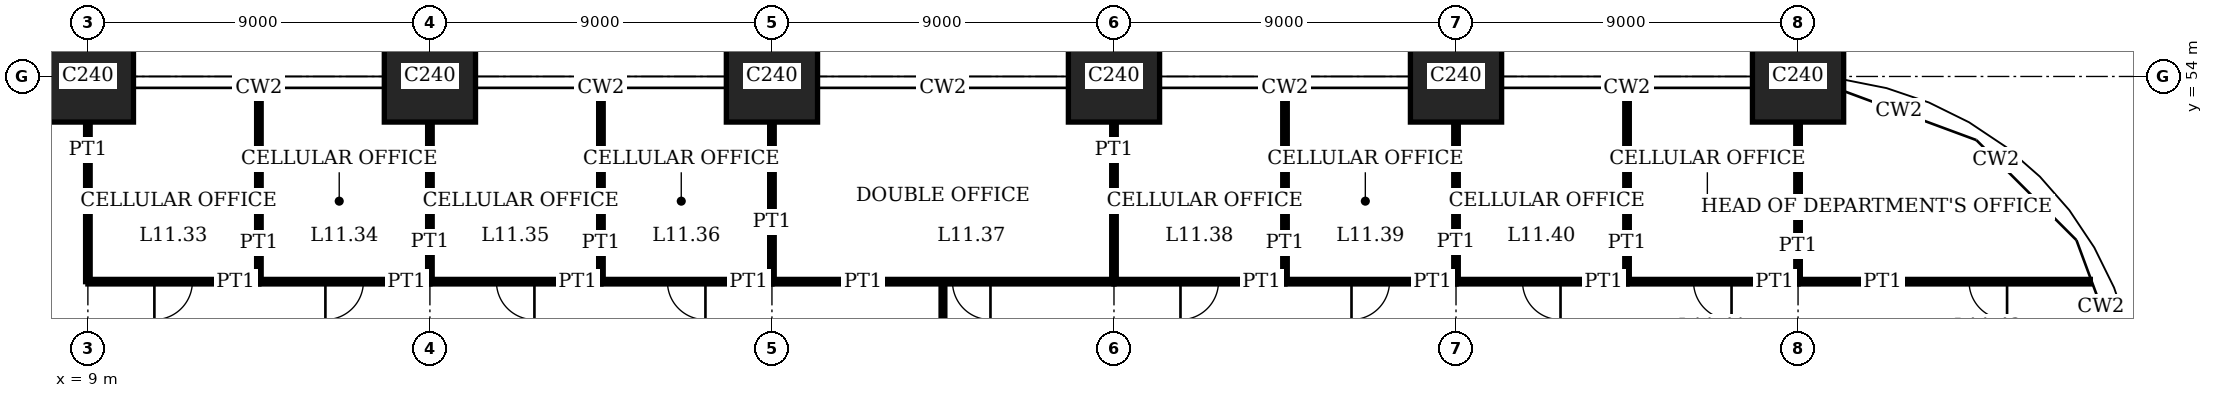
"""IFC4 building model, lengths in metres.
Left out: names, types, materials, properties, quantities, classifications, styles, units other than length and angle.
Written with IfcOpenShell. Run it as: python <this file> out.ifc"""

import sys

from ifc_helpers import new_model, si_unit, direction, frame, frame_2d, origin, origin_2d, place, context, subcontext, project, spatial, rectangle, extrude, element, fill, save


model = new_model("IFC4")
c1 = context("Model", 3, precision=1e-05, world=origin(), true_north=direction((0.0, 1.0)))
c2 = subcontext(c1, "Body", "Model", "MODEL_VIEW")
j1 = project(units=[si_unit("LENGTHUNIT", "METRE"), si_unit("PLANEANGLEUNIT", "RADIAN")], contexts=[c1])
p1 = place(None, origin())
s1 = spatial("IfcSite", under=j1, at=p1, CompositionType="ELEMENT")
p2 = place(p1, origin())
s2 = spatial("IfcBuilding", under=s1, at=p2, CompositionType="ELEMENT")
p3 = place(p2, frame((0.0, 0.0, 47.8)))
s3 = spatial("IfcBuildingStorey", under=s2, at=p3, CompositionType="ELEMENT", Elevation=47.8)
for number, where, z_axis, x_axis in (
    (1, (9.0, 54.0, 0.0), (0.0, 0.0, 1.0), (1.0, 0.0, 0.0)),
    (2, (18.0, 54.0, 0.0), (0.0, 0.0, 1.0), (1.0, 0.0, 0.0)),
    (3, (27.0, 54.0, 0.0), (0.0, 0.0, 1.0), (1.0, 0.0, 0.0)),
    (4, (36.0, 54.0, 0.0), (0.0, 0.0, 1.0), (1.0, 0.0, 0.0)),
    (5, (45.0, 54.0, 0.0), (0.0, 0.0, 1.0), (1.0, 0.0, 0.0)),
    (6, (54.0, 54.0, 0.0), (0.0, 0.0, 1.0), (1.0, 0.0, 0.0)),
):
    element("IfcColumn", number, at=place(p3, frame(where, z_axis=z_axis, x_axis=x_axis)), inside=s3, PredefinedType="COLUMN", context=c2, shape_type="SweptSolid", body=[
        extrude(rectangle(XDim=2.4, YDim=2.4, at=origin_2d()), origin(), (0.0, 0.0, 1.0), 4.0),
    ])
p4 = place(p3, frame((9.0, 48.6, 0.0), z_axis=(0.0, 0.0, 1.0), x_axis=(1.0, 0.0, 0.0)))
e7 = element("IfcWall", 7, at=p4, inside=s3, PredefinedType="PARTITIONING", context=c2, shape_type="SweptSolid", body=[
    extrude(rectangle(XDim=4.5, YDim=0.12, at=frame_2d((2.25, 0.0))), origin(), (0.0, 0.0, 1.0), 3.75),
])
p5 = place(p4, frame((1.75, 0.0, 0.0)))
e8 = element("IfcOpeningElement", 8, at=p5, cuts=e7, PredefinedType="OPENING", context=c2, shape_type="SweptSolid", body=[
    extrude(rectangle(XDim=1.0, YDim=2.4, at=frame_2d((0.5, 1.2))), frame((0.0, 0.07, 0.0), z_axis=(0.0, -1.0, 0.0), x_axis=(1.0, 0.0, 0.0)), (0.0, 0.0, 1.0), 0.14),
])
p6 = place(p3, frame((13.5, 48.6, 0.0), z_axis=(0.0, 0.0, 1.0), x_axis=(1.0, 0.0, 0.0)))
e9 = element("IfcWall", 9, at=p6, inside=s3, PredefinedType="PARTITIONING", context=c2, shape_type="SweptSolid", body=[
    extrude(rectangle(XDim=4.5, YDim=0.12, at=frame_2d((2.25, 0.0))), origin(), (0.0, 0.0, 1.0), 3.75),
])
p7 = place(p6, frame((1.75, 0.0, 0.0)))
e10 = element("IfcOpeningElement", 10, at=p7, cuts=e9, PredefinedType="OPENING", context=c2, shape_type="SweptSolid", body=[
    extrude(rectangle(XDim=1.0, YDim=2.4, at=frame_2d((0.5, 1.2))), frame((0.0, 0.07, 0.0), z_axis=(0.0, -1.0, 0.0), x_axis=(1.0, 0.0, 0.0)), (0.0, 0.0, 1.0), 0.14),
])
p8 = place(p3, frame((18.0, 48.6, 0.0), z_axis=(0.0, 0.0, 1.0), x_axis=(1.0, 0.0, 0.0)))
e11 = element("IfcWall", 11, at=p8, inside=s3, PredefinedType="PARTITIONING", context=c2, shape_type="SweptSolid", body=[
    extrude(rectangle(XDim=4.5, YDim=0.12, at=frame_2d((2.25, 0.0))), origin(), (0.0, 0.0, 1.0), 3.75),
])
p9 = place(p8, frame((1.75, 0.0, 0.0)))
e12 = element("IfcOpeningElement", 12, at=p9, cuts=e11, PredefinedType="OPENING", context=c2, shape_type="SweptSolid", body=[
    extrude(rectangle(XDim=1.0, YDim=2.4, at=frame_2d((0.5, 1.2))), frame((0.0, 0.07, 0.0), z_axis=(0.0, -1.0, 0.0), x_axis=(1.0, 0.0, 0.0)), (0.0, 0.0, 1.0), 0.14),
])
p10 = place(p3, frame((22.5, 48.6, 0.0), z_axis=(0.0, 0.0, 1.0), x_axis=(1.0, 0.0, 0.0)))
e13 = element("IfcWall", 13, at=p10, inside=s3, PredefinedType="PARTITIONING", context=c2, shape_type="SweptSolid", body=[
    extrude(rectangle(XDim=4.5, YDim=0.12, at=frame_2d((2.25, 0.0))), origin(), (0.0, 0.0, 1.0), 3.75),
])
p11 = place(p10, frame((1.75, 0.0, 0.0)))
e14 = element("IfcOpeningElement", 14, at=p11, cuts=e13, PredefinedType="OPENING", context=c2, shape_type="SweptSolid", body=[
    extrude(rectangle(XDim=1.0, YDim=2.4, at=frame_2d((0.5, 1.2))), frame((0.0, 0.07, 0.0), z_axis=(0.0, -1.0, 0.0), x_axis=(1.0, 0.0, 0.0)), (0.0, 0.0, 1.0), 0.14),
])
p12 = place(p3, frame((27.0, 48.6, 0.0), z_axis=(0.0, 0.0, 1.0), x_axis=(1.0, 0.0, 0.0)))
e15 = element("IfcWall", 15, at=p12, inside=s3, PredefinedType="PARTITIONING", context=c2, shape_type="SweptSolid", body=[
    extrude(rectangle(XDim=9.0, YDim=0.12, at=frame_2d((4.5, 0.0))), origin(), (0.0, 0.0, 1.0), 3.75),
])
p13 = place(p12, frame((4.75, 0.0, 0.0)))
e16 = element("IfcOpeningElement", 16, at=p13, cuts=e15, PredefinedType="OPENING", context=c2, shape_type="SweptSolid", body=[
    extrude(rectangle(XDim=1.0, YDim=2.4, at=frame_2d((0.5, 1.2))), frame((0.0, 0.07, 0.0), z_axis=(0.0, -1.0, 0.0), x_axis=(1.0, 0.0, 0.0)), (0.0, 0.0, 1.0), 0.14),
])
p14 = place(p3, frame((36.0, 48.6, 0.0), z_axis=(0.0, 0.0, 1.0), x_axis=(1.0, 0.0, 0.0)))
e17 = element("IfcWall", 17, at=p14, inside=s3, PredefinedType="PARTITIONING", context=c2, shape_type="SweptSolid", body=[
    extrude(rectangle(XDim=4.5, YDim=0.12, at=frame_2d((2.25, 0.0))), origin(), (0.0, 0.0, 1.0), 3.75),
])
p15 = place(p14, frame((1.75, 0.0, 0.0)))
e18 = element("IfcOpeningElement", 18, at=p15, cuts=e17, PredefinedType="OPENING", context=c2, shape_type="SweptSolid", body=[
    extrude(rectangle(XDim=1.0, YDim=2.4, at=frame_2d((0.5, 1.2))), frame((0.0, 0.07, 0.0), z_axis=(0.0, -1.0, 0.0), x_axis=(1.0, 0.0, 0.0)), (0.0, 0.0, 1.0), 0.14),
])
p16 = place(p3, frame((40.5, 48.6, 0.0), z_axis=(0.0, 0.0, 1.0), x_axis=(1.0, 0.0, 0.0)))
e19 = element("IfcWall", 19, at=p16, inside=s3, PredefinedType="PARTITIONING", context=c2, shape_type="SweptSolid", body=[
    extrude(rectangle(XDim=4.5, YDim=0.12, at=frame_2d((2.25, 0.0))), origin(), (0.0, 0.0, 1.0), 3.75),
])
p17 = place(p16, frame((1.75, 0.0, 0.0)))
e20 = element("IfcOpeningElement", 20, at=p17, cuts=e19, PredefinedType="OPENING", context=c2, shape_type="SweptSolid", body=[
    extrude(rectangle(XDim=1.0, YDim=2.4, at=frame_2d((0.5, 1.2))), frame((0.0, 0.07, 0.0), z_axis=(0.0, -1.0, 0.0), x_axis=(1.0, 0.0, 0.0)), (0.0, 0.0, 1.0), 0.14),
])
p18 = place(p3, frame((45.0, 48.6, 0.0), z_axis=(0.0, 0.0, 1.0), x_axis=(1.0, 0.0, 0.0)))
e21 = element("IfcWall", 21, at=p18, inside=s3, PredefinedType="PARTITIONING", context=c2, shape_type="SweptSolid", body=[
    extrude(rectangle(XDim=4.5, YDim=0.12, at=frame_2d((2.25, 0.0))), origin(), (0.0, 0.0, 1.0), 3.75),
])
p19 = place(p18, frame((1.75, 0.0, 0.0)))
e22 = element("IfcOpeningElement", 22, at=p19, cuts=e21, PredefinedType="OPENING", context=c2, shape_type="SweptSolid", body=[
    extrude(rectangle(XDim=1.0, YDim=2.4, at=frame_2d((0.5, 1.2))), frame((0.0, 0.07, 0.0), z_axis=(0.0, -1.0, 0.0), x_axis=(1.0, 0.0, 0.0)), (0.0, 0.0, 1.0), 0.14),
])
p20 = place(p3, frame((49.5, 48.6, 0.0), z_axis=(0.0, 0.0, 1.0), x_axis=(1.0, 0.0, 0.0)))
e23 = element("IfcWall", 23, at=p20, inside=s3, PredefinedType="PARTITIONING", context=c2, shape_type="SweptSolid", body=[
    extrude(rectangle(XDim=4.5, YDim=0.12, at=frame_2d((2.25, 0.0))), origin(), (0.0, 0.0, 1.0), 3.75),
])
p21 = place(p20, frame((1.75, 0.0, 0.0)))
e24 = element("IfcOpeningElement", 24, at=p21, cuts=e23, PredefinedType="OPENING", context=c2, shape_type="SweptSolid", body=[
    extrude(rectangle(XDim=1.0, YDim=2.4, at=frame_2d((0.5, 1.2))), frame((0.0, 0.07, 0.0), z_axis=(0.0, -1.0, 0.0), x_axis=(1.0, 0.0, 0.0)), (0.0, 0.0, 1.0), 0.14),
])
p22 = place(p3, frame((54.0, 48.6, 0.0), z_axis=(0.0, 0.0, 1.0), x_axis=(1.0, 0.0, 0.0)))
e25 = element("IfcWall", 25, at=p22, inside=s3, PredefinedType="PARTITIONING", context=c2, shape_type="SweptSolid", body=[
    extrude(rectangle(XDim=7.69, YDim=0.12, at=frame_2d((3.845, 0.0))), origin(), (0.0, 0.0, 1.0), 3.75),
])
p23 = place(p22, frame((4.5, 0.0, 0.0)))
e26 = element("IfcOpeningElement", 26, at=p23, cuts=e25, PredefinedType="OPENING", context=c2, shape_type="SweptSolid", body=[
    extrude(rectangle(XDim=1.0, YDim=2.4, at=frame_2d((0.5, 1.2))), frame((0.0, 0.07, 0.0), z_axis=(0.0, -1.0, 0.0), x_axis=(1.0, 0.0, 0.0)), (0.0, 0.0, 1.0), 0.14),
])
p24 = place(p3, frame((9.0, 48.6, 0.0), z_axis=(0.0, 0.0, 1.0), x_axis=(0.0, 1.0, 0.0)))
e27 = element("IfcWall", 27, at=p24, inside=s3, PredefinedType="PARTITIONING", context=c2, shape_type="SweptSolid", body=[
    extrude(rectangle(XDim=4.2, YDim=0.12, at=frame_2d((2.1, 0.0))), origin(), (0.0, 0.0, 1.0), 3.05),
])
p25 = place(p3, frame((13.5, 48.6, 0.0), z_axis=(0.0, 0.0, 1.0), x_axis=(0.0, 1.0, 0.0)))
e28 = element("IfcWall", 28, at=p25, inside=s3, PredefinedType="PARTITIONING", context=c2, shape_type="SweptSolid", body=[
    extrude(rectangle(XDim=5.09, YDim=0.12, at=frame_2d((2.545, 0.0))), origin(), (0.0, 0.0, 1.0), 3.75),
])
p26 = place(p3, frame((18.0, 48.6, 0.0), z_axis=(0.0, 0.0, 1.0), x_axis=(0.0, 1.0, 0.0)))
e29 = element("IfcWall", 29, at=p26, inside=s3, PredefinedType="PARTITIONING", context=c2, shape_type="SweptSolid", body=[
    extrude(rectangle(XDim=4.2, YDim=0.12, at=frame_2d((2.1, 0.0))), origin(), (0.0, 0.0, 1.0), 3.05),
])
p27 = place(p3, frame((22.5, 48.6, 0.0), z_axis=(0.0, 0.0, 1.0), x_axis=(0.0, 1.0, 0.0)))
e30 = element("IfcWall", 30, at=p27, inside=s3, PredefinedType="PARTITIONING", context=c2, shape_type="SweptSolid", body=[
    extrude(rectangle(XDim=5.09, YDim=0.12, at=frame_2d((2.545, 0.0))), origin(), (0.0, 0.0, 1.0), 3.75),
])
p28 = place(p3, frame((27.0, 48.6, 0.0), z_axis=(0.0, 0.0, 1.0), x_axis=(0.0, 1.0, 0.0)))
e31 = element("IfcWall", 31, at=p28, inside=s3, PredefinedType="PARTITIONING", context=c2, shape_type="SweptSolid", body=[
    extrude(rectangle(XDim=4.2, YDim=0.12, at=frame_2d((2.1, 0.0))), origin(), (0.0, 0.0, 1.0), 3.05),
])
p29 = place(p3, frame((31.5, 38.35, 0.0), z_axis=(0.0, 0.0, 1.0), x_axis=(0.0, 1.0, 0.0)))
e32 = element("IfcWall", 32, at=p29, inside=s3, PredefinedType="PARTITIONING", context=c2, shape_type="SweptSolid", body=[
    extrude(rectangle(XDim=10.26, YDim=0.1, at=frame_2d((5.13, 0.0))), origin(), (0.0, 0.0, 1.0), 3.75),
])
p30 = place(p3, frame((36.0, 48.6, 0.0), z_axis=(0.0, 0.0, 1.0), x_axis=(0.0, 1.0, 0.0)))
e33 = element("IfcWall", 33, at=p30, inside=s3, PredefinedType="PARTITIONING", context=c2, shape_type="SweptSolid", body=[
    extrude(rectangle(XDim=4.2, YDim=0.12, at=frame_2d((2.1, 0.0))), origin(), (0.0, 0.0, 1.0), 3.05),
])
p31 = place(p3, frame((40.5, 48.6, 0.0), z_axis=(0.0, 0.0, 1.0), x_axis=(0.0, 1.0, 0.0)))
e34 = element("IfcWall", 34, at=p31, inside=s3, PredefinedType="PARTITIONING", context=c2, shape_type="SweptSolid", body=[
    extrude(rectangle(XDim=5.09, YDim=0.12, at=frame_2d((2.545, 0.0))), origin(), (0.0, 0.0, 1.0), 3.75),
])
p32 = place(p3, frame((45.0, 48.6, 0.0), z_axis=(0.0, 0.0, 1.0), x_axis=(0.0, 1.0, 0.0)))
e35 = element("IfcWall", 35, at=p32, inside=s3, PredefinedType="PARTITIONING", context=c2, shape_type="SweptSolid", body=[
    extrude(rectangle(XDim=4.2, YDim=0.12, at=frame_2d((2.1, 0.0))), origin(), (0.0, 0.0, 1.0), 3.05),
])
p33 = place(p3, frame((49.5, 48.6, 0.0), z_axis=(0.0, 0.0, 1.0), x_axis=(0.0, 1.0, 0.0)))
e36 = element("IfcWall", 36, at=p33, inside=s3, PredefinedType="PARTITIONING", context=c2, shape_type="SweptSolid", body=[
    extrude(rectangle(XDim=5.09, YDim=0.12, at=frame_2d((2.545, 0.0))), origin(), (0.0, 0.0, 1.0), 3.75),
])
p34 = place(p3, frame((54.0, 48.6, 0.0), z_axis=(0.0, 0.0, 1.0), x_axis=(0.0, 1.0, 0.0)))
e37 = element("IfcWall", 37, at=p34, inside=s3, PredefinedType="PARTITIONING", context=c2, shape_type="SweptSolid", body=[
    extrude(rectangle(XDim=4.2, YDim=0.12, at=frame_2d((2.1, 0.0))), origin(), (0.0, 0.0, 1.0), 3.05),
])
p35 = place(p5, origin())
e38 = element("IfcDoor", 38, at=p35, inside=s3, OperationType="SINGLE_SWING_LEFT", PredefinedType="DOOR", context=c2, shape_type="SweptSolid", body=[
    extrude(rectangle(XDim=1.0, YDim=2.4, at=frame_2d((0.5, 1.2))), frame((0.0, 0.025, 0.0), z_axis=(0.0, -1.0, 0.0), x_axis=(1.0, 0.0, 0.0)), (0.0, 0.0, 1.0), 0.05),
])
fill(e8, e38)
p36 = place(p7, origin())
e39 = element("IfcDoor", 39, at=p36, inside=s3, OperationType="SINGLE_SWING_LEFT", PredefinedType="DOOR", context=c2, shape_type="SweptSolid", body=[
    extrude(rectangle(XDim=1.0, YDim=2.4, at=frame_2d((0.5, 1.2))), frame((0.0, 0.025, 0.0), z_axis=(0.0, -1.0, 0.0), x_axis=(1.0, 0.0, 0.0)), (0.0, 0.0, 1.0), 0.05),
])
fill(e10, e39)
p37 = place(p9, origin())
e40 = element("IfcDoor", 40, at=p37, inside=s3, OperationType="SINGLE_SWING_RIGHT", PredefinedType="DOOR", context=c2, shape_type="SweptSolid", body=[
    extrude(rectangle(XDim=1.0, YDim=2.4, at=frame_2d((0.5, 1.2))), frame((0.0, 0.025, 0.0), z_axis=(0.0, -1.0, 0.0), x_axis=(1.0, 0.0, 0.0)), (0.0, 0.0, 1.0), 0.05),
])
fill(e12, e40)
p38 = place(p11, origin())
e41 = element("IfcDoor", 41, at=p38, inside=s3, OperationType="SINGLE_SWING_RIGHT", PredefinedType="DOOR", context=c2, shape_type="SweptSolid", body=[
    extrude(rectangle(XDim=1.0, YDim=2.4, at=frame_2d((0.5, 1.2))), frame((0.0, 0.025, 0.0), z_axis=(0.0, -1.0, 0.0), x_axis=(1.0, 0.0, 0.0)), (0.0, 0.0, 1.0), 0.05),
])
fill(e14, e41)
p39 = place(p13, origin())
e42 = element("IfcDoor", 42, at=p39, inside=s3, OperationType="SINGLE_SWING_RIGHT", PredefinedType="DOOR", context=c2, shape_type="SweptSolid", body=[
    extrude(rectangle(XDim=1.0, YDim=2.4, at=frame_2d((0.5, 1.2))), frame((0.0, 0.025, 0.0), z_axis=(0.0, -1.0, 0.0), x_axis=(1.0, 0.0, 0.0)), (0.0, 0.0, 1.0), 0.05),
])
fill(e16, e42)
p40 = place(p15, origin())
e43 = element("IfcDoor", 43, at=p40, inside=s3, OperationType="SINGLE_SWING_LEFT", PredefinedType="DOOR", context=c2, shape_type="SweptSolid", body=[
    extrude(rectangle(XDim=1.0, YDim=2.4, at=frame_2d((0.5, 1.2))), frame((0.0, 0.025, 0.0), z_axis=(0.0, -1.0, 0.0), x_axis=(1.0, 0.0, 0.0)), (0.0, 0.0, 1.0), 0.05),
])
fill(e18, e43)
p41 = place(p17, origin())
e44 = element("IfcDoor", 44, at=p41, inside=s3, OperationType="SINGLE_SWING_LEFT", PredefinedType="DOOR", context=c2, shape_type="SweptSolid", body=[
    extrude(rectangle(XDim=1.0, YDim=2.4, at=frame_2d((0.5, 1.2))), frame((0.0, 0.025, 0.0), z_axis=(0.0, -1.0, 0.0), x_axis=(1.0, 0.0, 0.0)), (0.0, 0.0, 1.0), 0.05),
])
fill(e20, e44)
p42 = place(p19, origin())
e45 = element("IfcDoor", 45, at=p42, inside=s3, OperationType="SINGLE_SWING_RIGHT", PredefinedType="DOOR", context=c2, shape_type="SweptSolid", body=[
    extrude(rectangle(XDim=1.0, YDim=2.4, at=frame_2d((0.5, 1.2))), frame((0.0, 0.025, 0.0), z_axis=(0.0, -1.0, 0.0), x_axis=(1.0, 0.0, 0.0)), (0.0, 0.0, 1.0), 0.05),
])
fill(e22, e45)
p43 = place(p21, origin())
e46 = element("IfcDoor", 46, at=p43, inside=s3, OperationType="SINGLE_SWING_RIGHT", PredefinedType="DOOR", context=c2, shape_type="SweptSolid", body=[
    extrude(rectangle(XDim=1.0, YDim=2.4, at=frame_2d((0.5, 1.2))), frame((0.0, 0.025, 0.0), z_axis=(0.0, -1.0, 0.0), x_axis=(1.0, 0.0, 0.0)), (0.0, 0.0, 1.0), 0.05),
])
fill(e24, e46)
p44 = place(p23, origin())
e47 = element("IfcDoor", 47, at=p44, inside=s3, OperationType="SINGLE_SWING_RIGHT", PredefinedType="DOOR", context=c2, shape_type="SweptSolid", body=[
    extrude(rectangle(XDim=1.0, YDim=2.4, at=frame_2d((0.5, 1.2))), frame((0.0, 0.025, 0.0), z_axis=(0.0, -1.0, 0.0), x_axis=(1.0, 0.0, 0.0)), (0.0, 0.0, 1.0), 0.05),
])
fill(e26, e47)
save(model, sys.argv[1])
